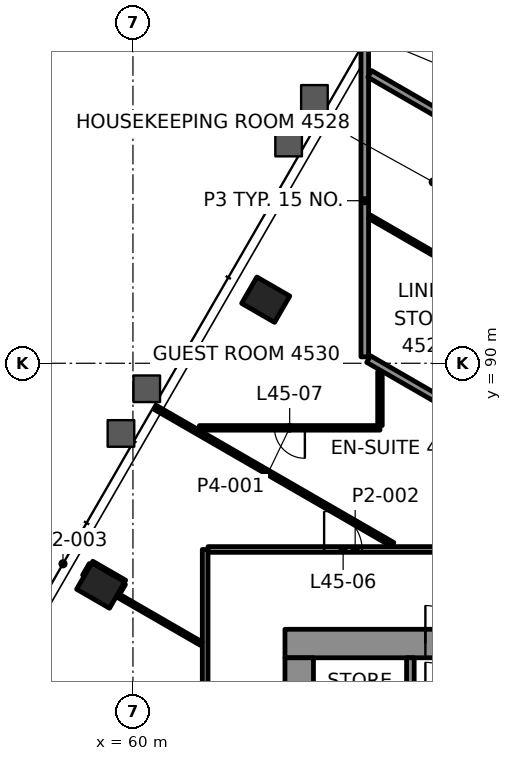
"""IFC4 building model, lengths in metres.
Left out: names, types, materials, properties, quantities, classifications, styles, units other than length and angle.
Written with IfcOpenShell. Run it as: python <this file> out.ifc"""

import sys

from ifc_helpers import new_model, si_unit, direction, frame, frame_2d, origin, origin_2d, place, context, subcontext, project, spatial, rectangle, hollow_rectangle, extrude, element, fill, save


model = new_model("IFC4")
c1 = context("Model", 3, precision=1e-05, world=origin(), true_north=direction((0.0, 1.0)))
c2 = subcontext(c1, "Body", "Model", "MODEL_VIEW")
j1 = project(units=[si_unit("LENGTHUNIT", "METRE"), si_unit("PLANEANGLEUNIT", "RADIAN")], contexts=[c1])
p1 = place(None, origin())
s1 = spatial("IfcSite", under=j1, at=p1, CompositionType="ELEMENT")
p2 = place(p1, origin())
s2 = spatial("IfcBuilding", under=s1, at=p2, CompositionType="ELEMENT")
p3 = place(p2, frame((0.0, 0.0, 194.8)))
s3 = spatial("IfcBuildingStorey", under=s2, at=p3, CompositionType="ELEMENT", Elevation=194.8)
for number, where, z_axis, x_axis in (
    (1, (63.494, 91.673, -0.0), (0.0, 0.0, 1.0), (-0.5, -0.866, 0.0)),
    (2, (59.151, 84.151, -0.0), (0.0, 0.0, 1.0), (-0.5, -0.866, 0.0)),
):
    element("IfcColumn", number, at=place(p3, frame(where, z_axis=z_axis, x_axis=x_axis)), inside=s3, PredefinedType="COLUMN", context=c2, shape_type="SweptSolid", body=[
        extrude(hollow_rectangle(XDim=0.8, YDim=1.0, WallThickness=0.05, at=origin_2d()), origin(), (0.0, 0.0, 1.0), 3.9),
    ])
p4 = place(p3, frame((64.0, 82.625, 0.0), z_axis=(0.0, 0.0, 1.0), x_axis=(1.0, 0.0, 0.0)))
e3 = element("IfcWall", 3, at=p4, inside=s3, PredefinedType="SHEAR", context=c2, shape_type="SweptSolid", body=[
    extrude(rectangle(XDim=22.0, YDim=0.75, at=frame_2d((11.0, 0.0))), origin(), (0.0, 0.0, 1.0), 3.7),
])
p5 = place(p4, frame((3.695, 0.0, 0.0)))
e4 = element("IfcOpeningElement", 4, at=p5, cuts=e3, PredefinedType="OPENING", context=c2, shape_type="SweptSolid", body=[
    extrude(rectangle(XDim=1.0, YDim=2.1, at=frame_2d((0.5, 1.05))), frame((0.0, 0.385, 0.0), z_axis=(0.0, -1.0, 0.0), x_axis=(1.0, 0.0, 0.0)), (0.0, 0.0, 1.0), 0.77),
])
p6 = place(p4, frame((17.505, 0.0, 0.0)))
e5 = element("IfcOpeningElement", 5, at=p6, cuts=e3, PredefinedType="OPENING", context=c2, shape_type="SweptSolid", body=[
    extrude(rectangle(XDim=1.0, YDim=2.1, at=frame_2d((0.5, 1.05))), frame((0.0, 0.385, 0.0), z_axis=(0.0, -1.0, 0.0), x_axis=(1.0, 0.0, 0.0)), (0.0, 0.0, 1.0), 0.77),
])
p7 = place(p4, frame((10.65, 0.0, 0.0)))
e6 = element("IfcOpeningElement", 6, at=p7, cuts=e3, PredefinedType="OPENING", context=c2, shape_type="SweptSolid", body=[
    extrude(rectangle(XDim=0.9, YDim=2.1, at=frame_2d((0.45, 1.05))), frame((0.0, 0.385, 0.0), z_axis=(0.0, -1.0, 0.0), x_axis=(1.0, 0.0, 0.0)), (0.0, 0.0, 1.0), 0.77),
])
p8 = place(p3, frame((64.375, 67.75, 0.0), z_axis=(0.0, 0.0, 1.0), x_axis=(0.0, 1.0, 0.0)))
e7 = element("IfcWall", 7, at=p8, inside=s3, PredefinedType="SHEAR", context=c2, shape_type="SweptSolid", body=[
    extrude(rectangle(XDim=14.5, YDim=0.75, at=frame_2d((7.25, 0.0))), origin(), (0.0, 0.0, 1.0), 3.7),
])
p9 = place(p8, frame((4.65, 0.0, 0.0)))
e8 = element("IfcOpeningElement", 8, at=p9, cuts=e7, PredefinedType="OPENING", context=c2, shape_type="SweptSolid", body=[
    extrude(rectangle(XDim=1.8, YDim=2.1, at=frame_2d((0.9, 1.05))), frame((0.0, 0.385, 0.0), z_axis=(0.0, -1.0, 0.0), x_axis=(1.0, 0.0, 0.0)), (0.0, 0.0, 1.0), 0.77),
])
p10 = place(p8, frame((8.5, 0.0, 0.0)))
e9 = element("IfcOpeningElement", 9, at=p10, cuts=e7, PredefinedType="OPENING", context=c2, shape_type="SweptSolid", body=[
    extrude(rectangle(XDim=0.9, YDim=2.1, at=frame_2d((0.45, 1.05))), frame((0.0, 0.385, 0.0), z_axis=(0.0, -1.0, 0.0), x_axis=(1.0, 0.0, 0.0)), (0.0, 0.0, 1.0), 0.77),
])
p11 = place(p8, frame((12.2, 0.0, 0.0)))
e10 = element("IfcOpeningElement", 10, at=p11, cuts=e7, PredefinedType="OPENING", context=c2, shape_type="SweptSolid", body=[
    extrude(rectangle(XDim=0.9, YDim=2.1, at=frame_2d((0.45, 1.05))), frame((0.0, 0.385, 0.0), z_axis=(0.0, -1.0, 0.0), x_axis=(1.0, 0.0, 0.0)), (0.0, 0.0, 1.0), 0.77),
])
p12 = place(p3, frame((61.976, 85.1, 0.0), z_axis=(0.0, 0.0, 1.0), x_axis=(1.0, 0.0, 0.0)))
e11 = element("IfcWall", 11, at=p12, inside=s3, PredefinedType="PARTITIONING", context=c2, shape_type="SweptSolid", body=[
    extrude(rectangle(XDim=7.744, YDim=0.15, at=frame_2d((3.872, 0.0))), origin(), (0.0, 0.0, 1.0), 3.1),
])
p13 = place(p12, frame((3.055, 0.0, 0.0)))
e12 = element("IfcOpeningElement", 12, at=p13, cuts=e11, PredefinedType="OPENING", context=c2, shape_type="SweptSolid", body=[
    extrude(rectangle(XDim=1.0, YDim=2.1, at=frame_2d((0.5, 1.05))), frame((0.0, 0.085, 0.0), z_axis=(0.0, -1.0, 0.0), x_axis=(1.0, 0.0, 0.0)), (0.0, 0.0, 1.0), 0.17),
])
p14 = place(p3, frame((66.5, 88.3, 0.0), z_axis=(0.0, 0.0, 1.0), x_axis=(-1.0, 0.0, 0.0)))
e13 = element("IfcWall", 13, at=p14, inside=s3, PredefinedType="PARTITIONING", context=c2, shape_type="SweptSolid", body=[
    extrude(rectangle(XDim=4.751, YDim=0.12, at=frame_2d((2.376, 0.0))), origin(), (0.0, 0.0, 1.0), 3.097),
])
p15 = place(p14, frame((1.976, 0.0, 0.0)))
e14 = element("IfcOpeningElement", 14, at=p15, cuts=e13, PredefinedType="OPENING", context=c2, shape_type="SweptSolid", body=[
    extrude(rectangle(XDim=0.8, YDim=2.1, at=frame_2d((0.4, 1.05))), frame((0.0, 0.07, 0.0), z_axis=(0.0, -1.0, 0.0), x_axis=(1.0, 0.0, 0.0)), (0.0, 0.0, 1.0), 0.14),
])
p16 = place(p3, frame((59.609, 83.944, 0.0), z_axis=(0.0, 0.0, 1.0), x_axis=(0.500264001326, 0.865872928886, 0.0)))
e15 = element("IfcWall", 15, at=p16, inside=s3, PredefinedType="PARTITIONING", context=c2, shape_type="SweptSolid", body=[
    extrude(rectangle(XDim=0.299, YDim=0.1, at=frame_2d((0.149, 0.0))), origin(), (0.0, 0.0, 1.0), 3.1),
])
p17 = place(p3, frame((58.718, 84.401, 0.0), z_axis=(0.0, 0.0, 1.0), x_axis=(0.499601298118, 0.866255472086, 0.0)))
e16 = element("IfcWall", 16, at=p17, inside=s3, PredefinedType="PARTITIONING", context=c2, shape_type="SweptSolid", body=[
    extrude(rectangle(XDim=0.349, YDim=0.1, at=frame_2d((0.174, 0.0))), origin(), (0.0, 0.0, 1.0), 3.1),
])
p18 = place(p3, frame((66.5, 88.361, 0.0), z_axis=(0.0, 0.0, 1.0), x_axis=(0.0, 1.0, 0.0)))
e17 = element("IfcWall", 17, at=p18, inside=s3, PredefinedType="PARTITIONING", context=c2, shape_type="SweptSolid", body=[
    extrude(rectangle(XDim=1.421, YDim=0.12, at=frame_2d((0.71, 0.0))), origin(), (0.0, 0.0, 1.0), 3.1),
])
p19 = place(p3, frame((66.1, 90.169, 0.0), z_axis=(0.0, 0.0, 1.0), x_axis=(0.0, 1.0, 0.0)))
e18 = element("IfcWall", 18, at=p19, inside=s3, PredefinedType="PARTITIONING", context=c2, shape_type="SweptSolid", body=[
    extrude(rectangle(XDim=8.218, YDim=0.2, at=frame_2d((4.109, 0.0))), origin(), (0.0, 0.0, 1.0), 3.022),
])
p20 = place(p3, frame((61.9, 68.476, 0.0), z_axis=(0.0, 0.0, 1.0), x_axis=(0.0, 1.0, 0.0)))
e19 = element("IfcWall", 19, at=p20, inside=s3, PredefinedType="PARTITIONING", context=c2, shape_type="SweptSolid", body=[
    extrude(rectangle(XDim=16.624, YDim=0.15, at=frame_2d((8.312, 0.0))), origin(), (0.0, 0.0, 1.0), 3.1),
])
p21 = place(p20, frame((8.276, 0.0, 0.0)))
e20 = element("IfcOpeningElement", 20, at=p21, cuts=e19, PredefinedType="OPENING", context=c2, shape_type="SweptSolid", body=[
    extrude(rectangle(XDim=1.0, YDim=2.1, at=frame_2d((0.5, 1.05))), frame((0.0, 0.085, 0.0), z_axis=(0.0, -1.0, 0.0), x_axis=(1.0, 0.0, 0.0)), (0.0, 0.0, 1.0), 0.17),
])
p22 = place(p3, frame((69.573, 95.685, 0.0), z_axis=(0.0, 0.0, 1.0), x_axis=(-0.8660191159, 0.500010890777, 0.0)))
e21 = element("IfcWall", 21, at=p22, inside=s3, PredefinedType="PARTITIONING", context=c2, shape_type="SweptSolid", body=[
    extrude(rectangle(XDim=3.859, YDim=0.2, at=frame_2d((1.929, 0.0))), origin(), (0.0, 0.0, 1.0), 3.022),
])
p23 = place(p3, frame((69.599, 91.909, 0.0), z_axis=(0.0, 0.0, 1.0), x_axis=(-0.866016482536, 0.500015451737, 0.0)))
e22 = element("IfcWall", 22, at=p23, inside=s3, PredefinedType="PARTITIONING", context=c2, shape_type="SweptSolid", body=[
    extrude(rectangle(XDim=3.895, YDim=0.1, at=frame_2d((1.948, 0.0))), origin(), (0.0, 0.0, 1.0), 3.1),
])
p24 = place(p3, frame((69.573, 88.163, 0.0), z_axis=(0.0, 0.0, 1.0), x_axis=(-0.866043624834, 0.499968438888, 0.0)))
e23 = element("IfcWall", 23, at=p24, inside=s3, PredefinedType="PARTITIONING", context=c2, shape_type="SweptSolid", body=[
    extrude(rectangle(XDim=3.895, YDim=0.2, at=frame_2d((1.947, 0.0))), origin(), (0.0, 0.0, 1.0), 3.1),
])
p25 = place(p3, frame((66.835, 85.23, 0.0), z_axis=(0.0, 0.0, 1.0), x_axis=(-0.866029508188, 0.499992890897, 0.0)))
e24 = element("IfcWall", 24, at=p25, inside=s3, PredefinedType="PARTITIONING", context=c2, shape_type="SweptSolid", body=[
    extrude(rectangle(XDim=7.215, YDim=0.12, at=frame_2d((3.608, 0.0))), origin(), (0.0, 0.0, 1.0), 3.022),
])
p26 = place(p3, frame((59.783, 84.247, 0.0), z_axis=(0.0, 0.0, 1.0), x_axis=(-0.866039090965, 0.499976292358, 0.0)))
e25 = element("IfcWall", 25, at=p26, inside=s3, PredefinedType="PARTITIONING", context=c2, shape_type="SweptSolid", body=[
    extrude(rectangle(XDim=0.999, YDim=0.1, at=frame_2d((0.5, 0.0))), origin(), (0.0, 0.0, 1.0), 3.022),
])
p27 = place(p3, frame((61.799, 82.622, 0.0), z_axis=(0.0, 0.0, 1.0), x_axis=(-0.866013897511, 0.50001992892, 0.0)))
e26 = element("IfcWall", 26, at=p27, inside=s3, PredefinedType="PARTITIONING", context=c2, shape_type="SweptSolid", body=[
    extrude(rectangle(XDim=2.558, YDim=0.1, at=frame_2d((1.279, 0.0))), origin(), (0.0, 0.0, 1.0), 3.1),
])
p28 = place(p3, frame((67.3, 81.28, 0.0), z_axis=(0.0, 0.0, 1.0), x_axis=(0.0, 1.0, 0.0)))
e27 = element("IfcWall", 27, at=p28, inside=s3, PredefinedType="PARTITIONING", context=c2, shape_type="SweptSolid", body=[
    extrude(rectangle(XDim=0.97, YDim=0.2, at=frame_2d((0.485, 0.0))), origin(), (0.0, 0.0, 1.0), 3.7),
])
p29 = place(p13, origin())
e28 = element("IfcDoor", 28, at=p29, inside=s3, OperationType="SINGLE_SWING_LEFT", PredefinedType="DOOR", context=c2, shape_type="SweptSolid", body=[
    extrude(rectangle(XDim=1.0, YDim=2.1, at=frame_2d((0.5, 1.05))), frame((0.0, 0.025, 0.0), z_axis=(0.0, -1.0, 0.0), x_axis=(1.0, 0.0, 0.0)), (0.0, 0.0, 1.0), 0.05),
])
fill(e12, e28)
p30 = place(p15, origin())
e29 = element("IfcDoor", 29, at=p30, inside=s3, OperationType="SINGLE_SWING_LEFT", PredefinedType="DOOR", context=c2, shape_type="SweptSolid", body=[
    extrude(rectangle(XDim=0.8, YDim=2.1, at=frame_2d((0.4, 1.05))), frame((0.0, 0.025, 0.0), z_axis=(0.0, -1.0, 0.0), x_axis=(1.0, 0.0, 0.0)), (0.0, 0.0, 1.0), 0.05),
])
fill(e14, e29)
p31 = place(p5, origin())
e30 = element("IfcDoor", 30, at=p31, inside=s3, OperationType="SINGLE_SWING_LEFT", PredefinedType="DOOR", context=c2, shape_type="SweptSolid", body=[
    extrude(rectangle(XDim=1.0, YDim=2.1, at=frame_2d((0.5, 1.05))), frame((0.0, 0.095, 0.0), z_axis=(0.0, -1.0, 0.0), x_axis=(1.0, 0.0, 0.0)), (0.0, 0.0, 1.0), 0.19),
])
fill(e4, e30)
save(model, sys.argv[1])
